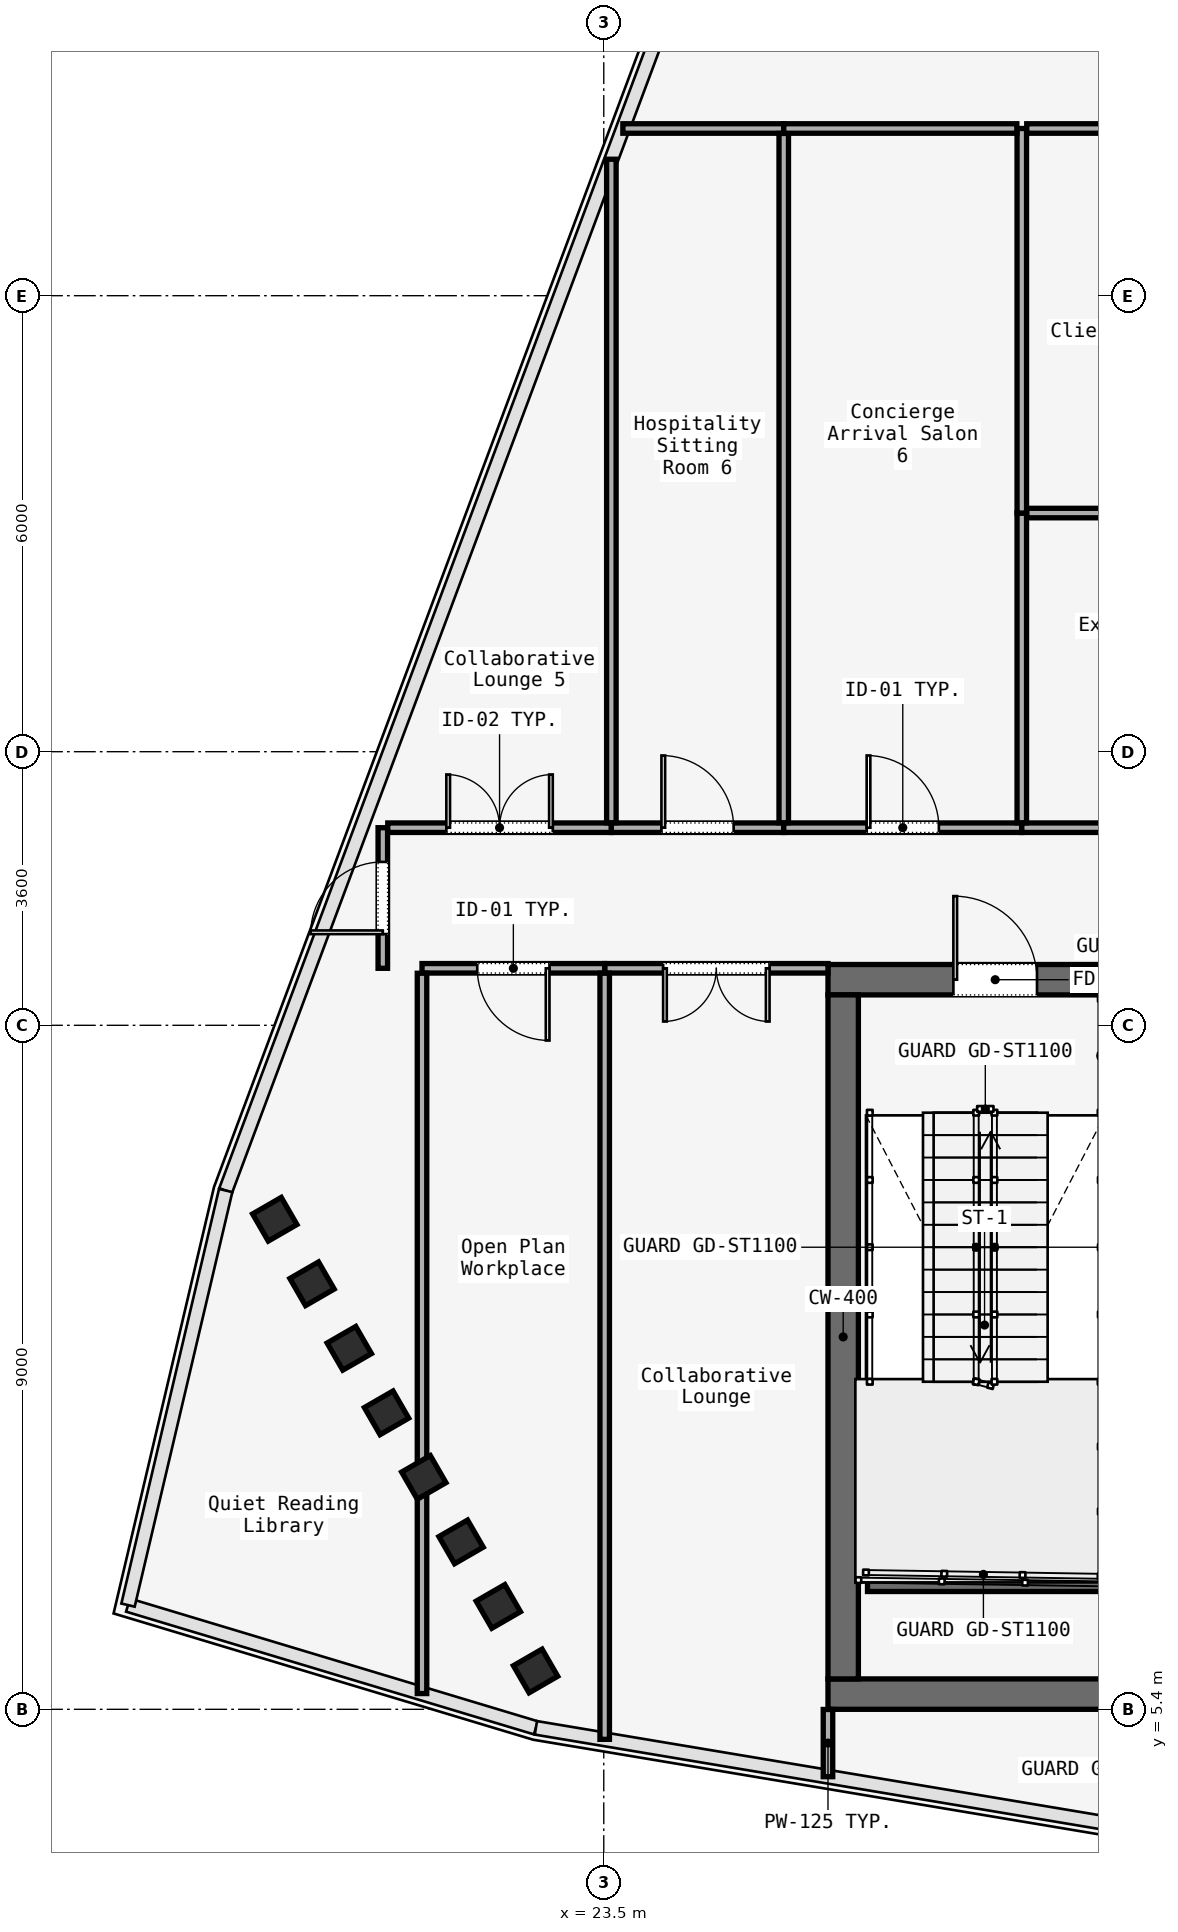
"""IFC4 building model, lengths in metres.
Left out: names, types, materials, properties, quantities, classifications, styles, units other than length and angle.
Written with IfcOpenShell. Run it as: python <this file> out.ifc"""

import sys

from ifc_helpers import new_model, si_unit, direction, frame, frame_2d, origin, origin_2d, place, context, subcontext, project, spatial, rectangle, i_section, extrude, element, fill, save


model = new_model("IFC4")
c1 = context("Model", 3, precision=1e-05, world=origin(), true_north=direction((0.0, 1.0)))
c2 = subcontext(c1, "Body", "Model", "MODEL_VIEW")
j1 = project(units=[si_unit("LENGTHUNIT", "METRE"), si_unit("PLANEANGLEUNIT", "RADIAN")], contexts=[c1])
p1 = place(None, origin())
s1 = spatial("IfcSite", under=j1, at=p1, CompositionType="ELEMENT")
p2 = place(p1, origin())
s2 = spatial("IfcBuilding", under=s1, at=p2, CompositionType="ELEMENT")
p3 = place(p2, frame((0.0, 0.0, 208.4)))
s3 = spatial("IfcBuildingStorey", under=s2, at=p3, CompositionType="ELEMENT", Elevation=208.4)
p4 = place(p3, frame((26.45, 15.0, 0.0), z_axis=(0.0, 0.0, 1.0), x_axis=(1.0, 0.0, 0.0)))
e1 = element("IfcWall", 1, at=p4, inside=s3, PredefinedType="SOLIDWALL", context=c2, shape_type="SweptSolid", body=[
    extrude(rectangle(XDim=31.1, YDim=0.4, at=frame_2d((15.55, 0.0))), origin(), (0.0, 0.0, 1.0), 4.52),
])
p5 = place(p4, frame((1.65, 0.0, 0.0)))
e2 = element("IfcOpeningElement", 2, at=p5, cuts=e1, PredefinedType="OPENING", context=c2, shape_type="SweptSolid", body=[
    extrude(rectangle(XDim=1.1, YDim=2.2, at=frame_2d((0.55, 1.1))), frame((0.0, 0.2, 0.0), z_axis=(0.0, -1.0, 0.0), x_axis=(1.0, 0.0, 0.0)), (0.0, 0.0, 1.0), 0.4),
])
p6 = place(p4, frame((13.65, 0.0, 0.0)))
e3 = element("IfcOpeningElement", 3, at=p6, cuts=e1, PredefinedType="OPENING", context=c2, shape_type="SweptSolid", body=[
    extrude(rectangle(XDim=1.1, YDim=2.2, at=frame_2d((0.55, 1.1))), frame((0.0, 0.2, 0.0), z_axis=(0.0, -1.0, 0.0), x_axis=(1.0, 0.0, 0.0)), (0.0, 0.0, 1.0), 0.4),
])
p7 = place(p4, frame((25.55, 0.0, 0.0)))
e4 = element("IfcOpeningElement", 4, at=p7, cuts=e1, PredefinedType="OPENING", context=c2, shape_type="SweptSolid", body=[
    extrude(rectangle(XDim=1.1, YDim=2.2, at=frame_2d((0.55, 1.1))), frame((0.0, 0.2, 0.0), z_axis=(0.0, -1.0, 0.0), x_axis=(1.0, 0.0, 0.0)), (0.0, 0.0, 1.0), 0.4),
])
p8 = place(p4, frame((10.7, 0.0, 0.0)))
e5 = element("IfcOpeningElement", 5, at=p8, cuts=e1, PredefinedType="OPENING", context=c2, shape_type="SweptSolid", body=[
    extrude(rectangle(XDim=1.4, YDim=2.2, at=frame_2d((0.7, 1.1))), frame((0.0, 0.2, 0.0), z_axis=(0.0, -1.0, 0.0), x_axis=(1.0, 0.0, 0.0)), (0.0, 0.0, 1.0), 0.4),
])
p9 = place(p4, frame((19.35, 0.0, 0.0)))
e6 = element("IfcOpeningElement", 6, at=p9, cuts=e1, PredefinedType="OPENING", context=c2, shape_type="SweptSolid", body=[
    extrude(rectangle(XDim=1.1, YDim=2.2, at=frame_2d((0.55, 1.1))), frame((0.0, 0.2, 0.0), z_axis=(0.0, -1.0, 0.0), x_axis=(1.0, 0.0, 0.0)), (0.0, 0.0, 1.0), 0.4),
])
p10 = place(p4, frame((21.4, 0.0, 0.0)))
e7 = element("IfcOpeningElement", 7, at=p10, cuts=e1, PredefinedType="OPENING", context=c2, shape_type="SweptSolid", body=[
    extrude(rectangle(XDim=0.9, YDim=2.1, at=frame_2d((0.45, 1.05))), frame((0.0, 0.2, 0.0), z_axis=(0.0, -1.0, 0.0), x_axis=(1.0, 0.0, 0.0)), (0.0, 0.0, 1.0), 0.4),
])
p11 = place(p4, frame((23.35, 0.0, 0.0)))
e8 = element("IfcOpeningElement", 8, at=p11, cuts=e1, PredefinedType="OPENING", context=c2, shape_type="SweptSolid", body=[
    extrude(rectangle(XDim=1.3, YDim=2.3, at=frame_2d((0.65, 1.15))), frame((0.0, 0.2, 0.0), z_axis=(0.0, -1.0, 0.0), x_axis=(1.0, 0.0, 0.0)), (0.0, 0.0, 1.0), 0.4),
])
p12 = place(p3, frame((26.45, 5.6, 0.0), z_axis=(0.0, 0.0, 1.0), x_axis=(1.0, 0.0, 0.0)))
e9 = element("IfcWall", 9, at=p12, inside=s3, PredefinedType="SOLIDWALL", context=c2, shape_type="SweptSolid", body=[
    extrude(rectangle(XDim=31.1, YDim=0.4, at=frame_2d((15.55, 0.0))), origin(), (0.0, 0.0, 1.0), 4.52),
])
p13 = place(p3, frame((26.65, 5.8, 0.0), z_axis=(0.0, 0.0, 1.0), x_axis=(0.0, 1.0, 0.0)))
e10 = element("IfcWall", 10, at=p13, inside=s3, PredefinedType="SOLIDWALL", context=c2, shape_type="SweptSolid", body=[
    extrude(rectangle(XDim=9.0, YDim=0.4, at=frame_2d((4.5, 0.0))), origin(), (0.0, 0.0, 1.0), 4.52),
])
for number, where, z_axis, x_axis in (
    (11, (19.171, 11.848, 0.0), (0.0, 0.0, 1.0), (-0.5, 0.866, 0.0)),
    (12, (19.662, 10.999, 0.0), (0.0, 0.0, 1.0), (-0.5, 0.866, 0.0)),
    (13, (20.152, 10.15, 0.0), (0.0, 0.0, 1.0), (-0.5, 0.866, 0.0)),
    (14, (20.642, 9.301, 0.0), (0.0, 0.0, 1.0), (-0.5, 0.866, 0.0)),
    (15, (21.132, 8.452, 0.0), (0.0, 0.0, 1.0), (-0.5, 0.866, 0.0)),
    (16, (21.623, 7.603, 0.0), (0.0, 0.0, 1.0), (-0.5, 0.866, 0.0)),
    (17, (22.113, 6.754, 0.0), (0.0, 0.0, 1.0), (-0.5, 0.866, 0.0)),
    (18, (22.603, 5.905, 0.0), (0.0, 0.0, 1.0), (-0.5, 0.866, 0.0)),
):
    element("IfcColumn", number, at=place(p3, frame(where, z_axis=z_axis, x_axis=x_axis)), inside=s3, PredefinedType="COLUMN", context=c2, shape_type="SweptSolid", body=[
        extrude(i_section(OverallWidth=0.412, OverallDepth=0.435, WebThickness=0.036, FlangeThickness=0.044, FilletRadius=0.015, at=origin_2d()), origin(), (0.0, 0.0, 1.0), 4.52),
    ])
p14 = place(p3, frame((26.97, 7.05, 0.0), z_axis=(0.0, 0.0, 1.0), x_axis=(1.0, 0.0, 0.0)))
e19 = element("IfcWall", 19, at=p14, inside=s3, PredefinedType="SOLIDWALL", context=c2, shape_type="SweptSolid", body=[
    extrude(rectangle(XDim=3.115, YDim=0.2, at=frame_2d((1.558, 0.0))), origin(), (0.0, 0.0, 1.0), 4.8),
])
p15 = place(p3, frame((26.45, 15.15, 0.0), z_axis=(0.0, 0.0, 1.0), x_axis=(-1.0, 0.0, 0.0)))
e20 = element("IfcWall", 20, at=p15, inside=s3, PredefinedType="PARTITIONING", context=c2, shape_type="SweptSolid", body=[
    extrude(rectangle(XDim=2.938, YDim=0.125, at=frame_2d((1.469, 0.0))), origin(), (0.0, 0.0, 1.0), 3.39),
])
p16 = place(p15, frame((0.769, 0.0, 0.0)))
e21 = element("IfcOpeningElement", 21, at=p16, cuts=e20, PredefinedType="OPENING", context=c2, shape_type="SweptSolid", body=[
    extrude(rectangle(XDim=1.4, YDim=2.2, at=frame_2d((0.7, 1.1))), frame((0.0, 0.062, 0.0), z_axis=(0.0, -1.0, 0.0), x_axis=(1.0, 0.0, 0.0)), (0.0, 0.0, 1.0), 0.125),
])
p17 = place(p3, frame((23.512, 15.15, 0.0), z_axis=(0.0, 0.0, 1.0), x_axis=(-1.0, 0.0, 0.0)))
e22 = element("IfcWall", 22, at=p17, inside=s3, PredefinedType="PARTITIONING", context=c2, shape_type="SweptSolid", body=[
    extrude(rectangle(XDim=2.404, YDim=0.125, at=frame_2d((1.202, 0.0))), origin(), (0.0, 0.0, 1.0), 3.39),
])
p18 = place(p17, frame((0.727, 0.0, 0.0)))
e23 = element("IfcOpeningElement", 23, at=p18, cuts=e22, PredefinedType="OPENING", context=c2, shape_type="SweptSolid", body=[
    extrude(rectangle(XDim=0.95, YDim=2.2, at=frame_2d((0.475, 1.1))), frame((0.0, 0.062, 0.0), z_axis=(0.0, -1.0, 0.0), x_axis=(1.0, 0.0, 0.0)), (0.0, 0.0, 1.0), 0.125),
])
p19 = place(p3, frame((20.593, 15.15, 0.0), z_axis=(0.0, 0.0, 1.0), x_axis=(0.0, 1.0, 0.0)))
e24 = element("IfcWall", 24, at=p19, inside=s3, PredefinedType="PARTITIONING", context=c2, shape_type="SweptSolid", body=[
    extrude(rectangle(XDim=1.85, YDim=0.125, at=frame_2d((0.925, 0.0))), origin(), (0.0, 0.0, 1.0), 3.39),
])
p20 = place(p19, frame((0.45, 0.0, 0.0)))
e25 = element("IfcOpeningElement", 25, at=p20, cuts=e24, PredefinedType="OPENING", context=c2, shape_type="SweptSolid", body=[
    extrude(rectangle(XDim=0.95, YDim=2.2, at=frame_2d((0.475, 1.1))), frame((0.0, 0.062, 0.0), z_axis=(0.0, -1.0, 0.0), x_axis=(1.0, 0.0, 0.0)), (0.0, 0.0, 1.0), 0.125),
])
p21 = place(p3, frame((20.658, 17.0, 0.0), z_axis=(0.0, 0.0, 1.0), x_axis=(1.0, 0.0, 0.0)))
e26 = element("IfcWall", 26, at=p21, inside=s3, PredefinedType="PARTITIONING", context=c2, shape_type="SweptSolid", body=[
    extrude(rectangle(XDim=2.942, YDim=0.125, at=frame_2d((1.471, 0.0))), origin(), (0.0, 0.0, 1.0), 3.39),
])
p22 = place(p21, frame((0.771, 0.0, 0.0)))
e27 = element("IfcOpeningElement", 27, at=p22, cuts=e26, PredefinedType="OPENING", context=c2, shape_type="SweptSolid", body=[
    extrude(rectangle(XDim=1.4, YDim=2.2, at=frame_2d((0.7, 1.1))), frame((0.0, 0.062, 0.0), z_axis=(0.0, -1.0, 0.0), x_axis=(1.0, 0.0, 0.0)), (0.0, 0.0, 1.0), 0.125),
])
p23 = place(p3, frame((23.6, 17.0, 0.0), z_axis=(0.0, 0.0, 1.0), x_axis=(1.0, 0.0, 0.0)))
e28 = element("IfcWall", 28, at=p23, inside=s3, PredefinedType="PARTITIONING", context=c2, shape_type="SweptSolid", body=[
    extrude(rectangle(XDim=2.268, YDim=0.125, at=frame_2d((1.134, 0.0))), origin(), (0.0, 0.0, 1.0), 3.39),
])
p24 = place(p23, frame((0.659, 0.0, 0.0)))
e29 = element("IfcOpeningElement", 29, at=p24, cuts=e28, PredefinedType="OPENING", context=c2, shape_type="SweptSolid", body=[
    extrude(rectangle(XDim=0.95, YDim=2.2, at=frame_2d((0.475, 1.1))), frame((0.0, 0.062, 0.0), z_axis=(0.0, -1.0, 0.0), x_axis=(1.0, 0.0, 0.0)), (0.0, 0.0, 1.0), 0.125),
])
p25 = place(p3, frame((25.868, 17.0, 0.0), z_axis=(0.0, 0.0, 1.0), x_axis=(1.0, 0.0, 0.0)))
e30 = element("IfcWall", 30, at=p25, inside=s3, PredefinedType="PARTITIONING", context=c2, shape_type="SweptSolid", body=[
    extrude(rectangle(XDim=3.132, YDim=0.125, at=frame_2d((1.566, 0.0))), origin(), (0.0, 0.0, 1.0), 3.39),
])
p26 = place(p25, frame((1.091, 0.0, 0.0)))
e31 = element("IfcOpeningElement", 31, at=p26, cuts=e30, PredefinedType="OPENING", context=c2, shape_type="SweptSolid", body=[
    extrude(rectangle(XDim=0.95, YDim=2.2, at=frame_2d((0.475, 1.1))), frame((0.0, 0.062, 0.0), z_axis=(0.0, -1.0, 0.0), x_axis=(1.0, 0.0, 0.0)), (0.0, 0.0, 1.0), 0.125),
])
p27 = place(p3, frame((29.0, 17.0, 0.0), z_axis=(0.0, 0.0, 1.0), x_axis=(1.0, 0.0, 0.0)))
e32 = element("IfcWall", 32, at=p27, inside=s3, PredefinedType="PARTITIONING", context=c2, shape_type="SweptSolid", body=[
    extrude(rectangle(XDim=5.0, YDim=0.125, at=frame_2d((2.5, 0.0))), origin(), (0.0, 0.0, 1.0), 3.39),
])
p28 = place(p27, frame((1.8, 0.0, 0.0)))
e33 = element("IfcOpeningElement", 33, at=p28, cuts=e32, PredefinedType="OPENING", context=c2, shape_type="SweptSolid", body=[
    extrude(rectangle(XDim=1.4, YDim=2.2, at=frame_2d((0.7, 1.1))), frame((0.0, 0.062, 0.0), z_axis=(0.0, -1.0, 0.0), x_axis=(1.0, 0.0, 0.0)), (0.0, 0.0, 1.0), 0.125),
])
p29 = place(p3, frame((26.45, 5.398, 0.0), z_axis=(0.0, 0.0, 1.0), x_axis=(0.0, -1.0, 0.0)))
e34 = element("IfcWall", 34, at=p29, inside=s3, PredefinedType="PARTITIONING", context=c2, shape_type="SweptSolid", body=[
    extrude(rectangle(XDim=0.885, YDim=0.125, at=frame_2d((0.442, 0.0))), origin(), (0.0, 0.0, 1.0), 3.39),
])
p30 = place(p3, frame((23.512, 5.005, 0.0), z_axis=(0.0, 0.0, 1.0), x_axis=(0.0, 1.0, 0.0)))
e35 = element("IfcWall", 35, at=p30, inside=s3, PredefinedType="PARTITIONING", context=c2, shape_type="SweptSolid", body=[
    extrude(rectangle(XDim=10.08, YDim=0.125, at=frame_2d((5.04, 0.0))), origin(), (0.0, 0.0, 1.0), 3.39),
])
p31 = place(p3, frame((21.109, 5.607, 0.0), z_axis=(0.0, 0.0, 1.0), x_axis=(0.0, 1.0, 0.0)))
e36 = element("IfcWall", 36, at=p31, inside=s3, PredefinedType="PARTITIONING", context=c2, shape_type="SweptSolid", body=[
    extrude(rectangle(XDim=9.478, YDim=0.125, at=frame_2d((4.739, 0.0))), origin(), (0.0, 0.0, 1.0), 3.39),
])
p32 = place(p3, frame((29.0, 17.065, 0.0), z_axis=(0.0, 0.0, 1.0), x_axis=(0.0, 1.0, 0.0)))
e37 = element("IfcWall", 37, at=p32, inside=s3, PredefinedType="PARTITIONING", context=c2, shape_type="SweptSolid", body=[
    extrude(rectangle(XDim=4.075, YDim=0.125, at=frame_2d((2.038, 0.0))), origin(), (0.0, 0.0, 1.0), 3.39),
])
p33 = place(p3, frame((29.065, 21.14, 0.0), z_axis=(0.0, 0.0, 1.0), x_axis=(1.0, 0.0, 0.0)))
e38 = element("IfcWall", 38, at=p33, inside=s3, PredefinedType="PARTITIONING", context=c2, shape_type="SweptSolid", body=[
    extrude(rectangle(XDim=4.935, YDim=0.125, at=frame_2d((2.468, 0.0))), origin(), (0.0, 0.0, 1.0), 3.39),
])
p34 = place(p3, frame((23.6, 25.796, 0.0), z_axis=(0.0, 0.0, 1.0), x_axis=(0.0, -1.0, 0.0)))
e39 = element("IfcWall", 39, at=p34, inside=s3, PredefinedType="PARTITIONING", context=c2, shape_type="SweptSolid", body=[
    extrude(rectangle(XDim=8.731, YDim=0.125, at=frame_2d((4.365, 0.0))), origin(), (0.0, 0.0, 1.0), 3.39),
])
p35 = place(p3, frame((23.751, 26.2, 0.0), z_axis=(0.0, 0.0, 1.0), x_axis=(1.0, 0.0, 0.0)))
e40 = element("IfcWall", 40, at=p35, inside=s3, PredefinedType="PARTITIONING", context=c2, shape_type="SweptSolid", body=[
    extrude(rectangle(XDim=2.117, YDim=0.125, at=frame_2d((1.058, 0.0))), origin(), (0.0, 0.0, 1.0), 3.39),
])
p36 = place(p3, frame((25.868, 26.135, 0.0), z_axis=(0.0, 0.0, 1.0), x_axis=(0.0, -1.0, 0.0)))
e41 = element("IfcWall", 41, at=p36, inside=s3, PredefinedType="PARTITIONING", context=c2, shape_type="SweptSolid", body=[
    extrude(rectangle(XDim=9.07, YDim=0.125, at=frame_2d((4.535, 0.0))), origin(), (0.0, 0.0, 1.0), 3.39),
])
p37 = place(p3, frame((29.0, 26.2, 0.0), z_axis=(0.0, 0.0, 1.0), x_axis=(0.0, -1.0, 0.0)))
e42 = element("IfcWall", 42, at=p37, inside=s3, PredefinedType="PARTITIONING", context=c2, shape_type="SweptSolid", body=[
    extrude(rectangle(XDim=5.06, YDim=0.125, at=frame_2d((2.53, 0.0))), origin(), (0.0, 0.0, 1.0), 3.39),
])
p38 = place(p3, frame((25.868, 26.2, 0.0), z_axis=(0.0, 0.0, 1.0), x_axis=(1.0, 0.0, 0.0)))
e43 = element("IfcWall", 43, at=p38, inside=s3, PredefinedType="PARTITIONING", context=c2, shape_type="SweptSolid", body=[
    extrude(rectangle(XDim=3.067, YDim=0.125, at=frame_2d((1.534, 0.0))), origin(), (0.0, 0.0, 1.0), 3.39),
])
p39 = place(p3, frame((29.065, 26.2, 0.0), z_axis=(0.0, 0.0, 1.0), x_axis=(1.0, 0.0, 0.0)))
e44 = element("IfcWall", 44, at=p39, inside=s3, PredefinedType="PARTITIONING", context=c2, shape_type="SweptSolid", body=[
    extrude(rectangle(XDim=4.87, YDim=0.125, at=frame_2d((2.435, 0.0))), origin(), (0.0, 0.0, 1.0), 3.39),
])
p40 = place(p5, origin())
e45 = element("IfcDoor", 45, at=p40, inside=s3, OperationType="SINGLE_SWING_LEFT", PredefinedType="DOOR", context=c2, shape_type="SweptSolid", body=[
    extrude(rectangle(XDim=1.1, YDim=2.2, at=frame_2d((0.55, 1.1))), frame((0.0, 0.025, 0.0), z_axis=(0.0, -1.0, 0.0), x_axis=(1.0, 0.0, 0.0)), (0.0, 0.0, 1.0), 0.05),
])
fill(e2, e45)
p41 = place(p16, origin())
e46 = element("IfcDoor", 46, at=p41, inside=s3, OperationType="SINGLE_SWING_LEFT", PredefinedType="DOOR", context=c2, shape_type="SweptSolid", body=[
    extrude(rectangle(XDim=1.4, YDim=2.2, at=frame_2d((0.7, 1.1))), frame((0.0, 0.025, 0.0), z_axis=(0.0, -1.0, 0.0), x_axis=(1.0, 0.0, 0.0)), (0.0, 0.0, 1.0), 0.05),
])
fill(e21, e46)
p42 = place(p18, origin())
e47 = element("IfcDoor", 47, at=p42, inside=s3, OperationType="SINGLE_SWING_LEFT", PredefinedType="DOOR", context=c2, shape_type="SweptSolid", body=[
    extrude(rectangle(XDim=0.95, YDim=2.2, at=frame_2d((0.475, 1.1))), frame((0.0, 0.025, 0.0), z_axis=(0.0, -1.0, 0.0), x_axis=(1.0, 0.0, 0.0)), (0.0, 0.0, 1.0), 0.05),
])
fill(e23, e47)
p43 = place(p20, origin())
e48 = element("IfcDoor", 48, at=p43, inside=s3, OperationType="SINGLE_SWING_RIGHT", PredefinedType="DOOR", context=c2, shape_type="SweptSolid", body=[
    extrude(rectangle(XDim=0.95, YDim=2.2, at=frame_2d((0.475, 1.1))), frame((0.0, 0.025, 0.0), z_axis=(0.0, -1.0, 0.0), x_axis=(1.0, 0.0, 0.0)), (0.0, 0.0, 1.0), 0.05),
])
fill(e25, e48)
p44 = place(p22, origin())
e49 = element("IfcDoor", 49, at=p44, inside=s3, OperationType="SINGLE_SWING_LEFT", PredefinedType="DOOR", context=c2, shape_type="SweptSolid", body=[
    extrude(rectangle(XDim=1.4, YDim=2.2, at=frame_2d((0.7, 1.1))), frame((0.0, 0.025, 0.0), z_axis=(0.0, -1.0, 0.0), x_axis=(1.0, 0.0, 0.0)), (0.0, 0.0, 1.0), 0.05),
])
fill(e27, e49)
p45 = place(p24, origin())
e50 = element("IfcDoor", 50, at=p45, inside=s3, OperationType="SINGLE_SWING_LEFT", PredefinedType="DOOR", context=c2, shape_type="SweptSolid", body=[
    extrude(rectangle(XDim=0.95, YDim=2.2, at=frame_2d((0.475, 1.1))), frame((0.0, 0.025, 0.0), z_axis=(0.0, -1.0, 0.0), x_axis=(1.0, 0.0, 0.0)), (0.0, 0.0, 1.0), 0.05),
])
fill(e29, e50)
p46 = place(p26, origin())
e51 = element("IfcDoor", 51, at=p46, inside=s3, OperationType="SINGLE_SWING_RIGHT", PredefinedType="DOOR", context=c2, shape_type="SweptSolid", body=[
    extrude(rectangle(XDim=0.95, YDim=2.2, at=frame_2d((0.475, 1.1))), frame((0.0, 0.025, 0.0), z_axis=(0.0, -1.0, 0.0), x_axis=(1.0, 0.0, 0.0)), (0.0, 0.0, 1.0), 0.05),
])
fill(e31, e51)
save(model, sys.argv[1])
